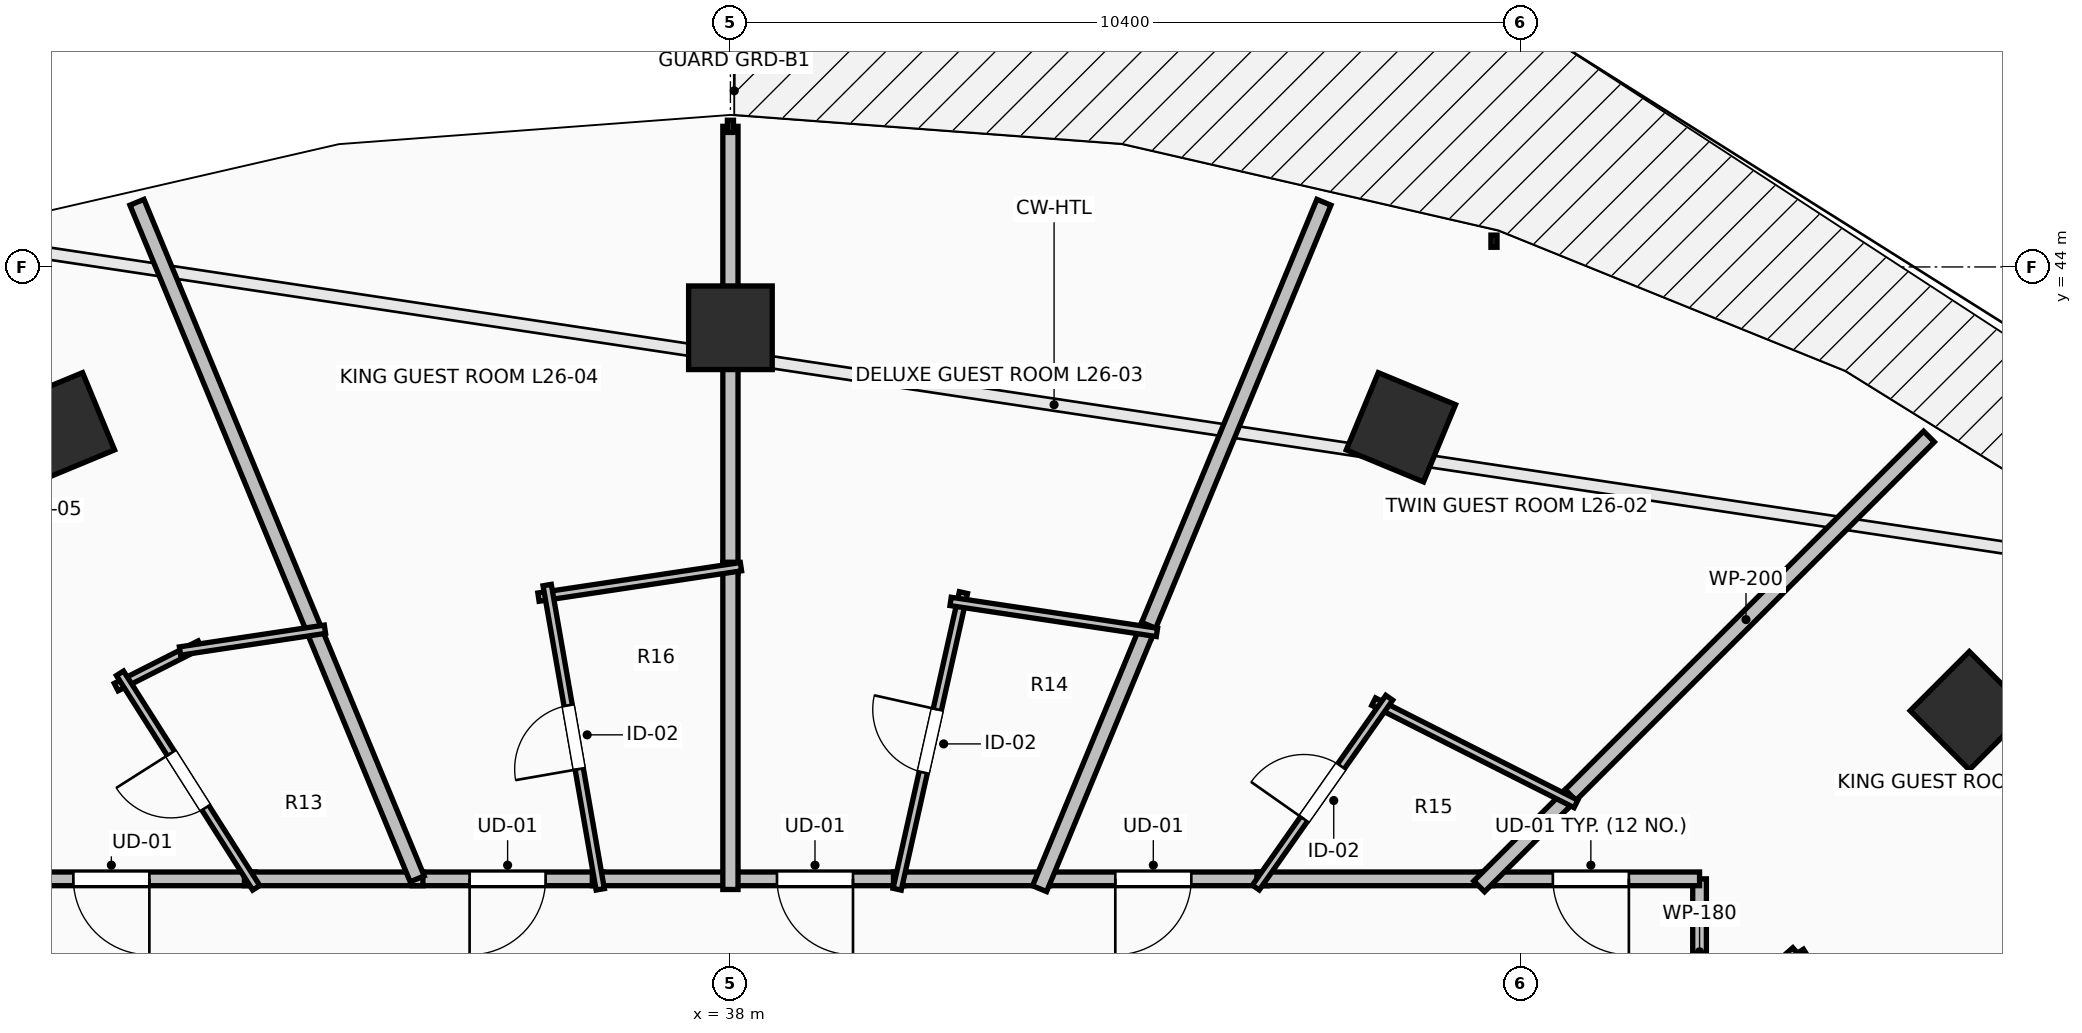
"""IFC4 building model, lengths in metres.
Left out: names, types, materials, properties, quantities, classifications, styles, units other than length and angle.
Written with IfcOpenShell. Run it as: python <this file> out.ifc"""

import sys

from ifc_helpers import new_model, si_unit, direction, frame, frame_2d, origin, origin_2d, place, context, subcontext, project, spatial, rectangle, extrude, element, fill, save


model = new_model("IFC4")
c1 = context("Model", 3, precision=1e-05, world=origin(), true_north=direction((0.0, 1.0)))
c2 = subcontext(c1, "Body", "Model", "MODEL_VIEW")
j1 = project(units=[si_unit("LENGTHUNIT", "METRE"), si_unit("PLANEANGLEUNIT", "RADIAN")], contexts=[c1])
p1 = place(None, origin())
s1 = spatial("IfcSite", under=j1, at=p1, CompositionType="ELEMENT")
p2 = place(p1, origin())
s2 = spatial("IfcBuilding", under=s1, at=p2, CompositionType="ELEMENT")
p3 = place(p2, frame((0.0, 0.0, 99.8)))
s3 = spatial("IfcBuildingStorey", under=s2, at=p3, CompositionType="ELEMENT", Elevation=99.8)
for number, where, z_axis, x_axis in (
    (1, (54.299, 38.162, 0.0), (0.0, 0.0, 1.0), (0.707, 0.707, 0.0)),
    (2, (46.821, 41.891, 0.0), (0.0, 0.0, 1.0), (0.383, 0.924, 0.0)),
    (3, (38.0, 43.2, 0.0), (0.0, 0.0, 1.0), (0.0, 1.0, 0.0)),
    (4, (29.179, 41.891, 0.0), (0.0, 0.0, 1.0), (-0.383, 0.924, 0.0)),
):
    element("IfcColumn", number, at=place(p3, frame(where, z_axis=z_axis, x_axis=x_axis)), inside=s3, PredefinedType="COLUMN", context=c2, shape_type="SweptSolid", body=[
        extrude(rectangle(XDim=1.1, YDim=1.1, at=origin_2d()), origin(), (0.0, 0.0, 1.0), 3.5),
    ])
p4 = place(p3, frame((50.75, 34.031, 0.0), z_axis=(0.0, 0.0, 1.0), x_axis=(0.0, 1.0, 0.0)))
e5 = element("IfcWall", 5, at=p4, inside=s3, PredefinedType="PARTITIONING", context=c2, shape_type="SweptSolid", body=[
    extrude(rectangle(XDim=1.919, YDim=0.18, at=frame_2d((0.959, 0.0))), origin(), (0.0, 0.0, 1.0), 2.432),
])
p5 = place(p3, frame((50.75, 35.95, 0.0), z_axis=(0.0, 0.0, 1.0), x_axis=(-1.0, 0.0, 0.0)))
e6 = element("IfcWall", 6, at=p5, inside=s3, PredefinedType="PARTITIONING", context=c2, shape_type="SweptSolid", body=[
    extrude(rectangle(XDim=2.86, YDim=0.18, at=frame_2d((1.43, 0.0))), origin(), (0.0, 0.0, 1.0), 2.432),
])
p6 = place(p5, frame((0.93, 0.0, 0.0)))
e7 = element("IfcOpeningElement", 7, at=p6, cuts=e6, PredefinedType="OPENING", context=c2, shape_type="SweptSolid", body=[
    extrude(rectangle(XDim=1.0, YDim=2.15, at=frame_2d((0.5, 1.075))), frame((0.0, 0.105, 0.0), z_axis=(0.0, -1.0, 0.0), x_axis=(1.0, 0.0, 0.0)), (0.0, 0.0, 1.0), 0.21),
])
p7 = place(p3, frame((45.066, 35.95, 0.0), z_axis=(0.0, 0.0, 1.0), x_axis=(-1.0, 0.0, 0.0)))
e8 = element("IfcWall", 8, at=p7, inside=s3, PredefinedType="PARTITIONING", context=c2, shape_type="SweptSolid", body=[
    extrude(rectangle(XDim=3.005, YDim=0.18, at=frame_2d((1.502, 0.0))), origin(), (0.0, 0.0, 1.0), 3.24),
])
p8 = place(p7, frame((1.002, 0.0, 0.0)))
e9 = element("IfcOpeningElement", 9, at=p8, cuts=e8, PredefinedType="OPENING", context=c2, shape_type="SweptSolid", body=[
    extrude(rectangle(XDim=1.0, YDim=2.15, at=frame_2d((0.5, 1.075))), frame((0.0, 0.105, 0.0), z_axis=(0.0, -1.0, 0.0), x_axis=(1.0, 0.0, 0.0)), (0.0, 0.0, 1.0), 0.21),
])
p9 = place(p3, frame((48.03, 35.95, 0.0), z_axis=(0.0, 0.0, 1.0), x_axis=(-1.0, 0.0, 0.0)))
e10 = element("IfcWall", 10, at=p9, inside=s3, PredefinedType="PARTITIONING", context=c2, shape_type="SweptSolid", body=[
    extrude(rectangle(XDim=3.104, YDim=0.18, at=frame_2d((1.552, 0.0))), origin(), (0.0, 0.0, 1.0), 2.432),
])
p10 = place(p3, frame((40.285, 35.95, 0.0), z_axis=(0.0, 0.0, 1.0), x_axis=(-1.0, 0.0, 0.0)))
e11 = element("IfcWall", 11, at=p10, inside=s3, PredefinedType="PARTITIONING", context=c2, shape_type="SweptSolid", body=[
    extrude(rectangle(XDim=2.345, YDim=0.18, at=frame_2d((1.172, 0.0))), origin(), (0.0, 0.0, 1.0), 3.24),
])
p11 = place(p10, frame((0.673, 0.0, 0.0)))
e12 = element("IfcOpeningElement", 12, at=p11, cuts=e11, PredefinedType="OPENING", context=c2, shape_type="SweptSolid", body=[
    extrude(rectangle(XDim=1.0, YDim=2.15, at=frame_2d((0.5, 1.075))), frame((0.0, 0.105, 0.0), z_axis=(0.0, -1.0, 0.0), x_axis=(1.0, 0.0, 0.0)), (0.0, 0.0, 1.0), 0.21),
])
p12 = place(p3, frame((42.201, 35.95, 0.0), z_axis=(0.0, 0.0, 1.0), x_axis=(-1.0, 0.0, 0.0)))
e13 = element("IfcWall", 13, at=p12, inside=s3, PredefinedType="PARTITIONING", context=c2, shape_type="SweptSolid", body=[
    extrude(rectangle(XDim=2.056, YDim=0.18, at=frame_2d((1.028, 0.0))), origin(), (0.0, 0.0, 1.0), 3.24),
])
p13 = place(p3, frame((36.323, 35.95, 0.0), z_axis=(0.0, 0.0, 1.0), x_axis=(-1.0, 0.0, 0.0)))
e14 = element("IfcWall", 14, at=p13, inside=s3, PredefinedType="PARTITIONING", context=c2, shape_type="SweptSolid", body=[
    extrude(rectangle(XDim=2.509, YDim=0.18, at=frame_2d((1.254, 0.0))), origin(), (0.0, 0.0, 1.0), 3.24),
])
p14 = place(p13, frame((0.754, 0.0, 0.0)))
e15 = element("IfcOpeningElement", 15, at=p14, cuts=e14, PredefinedType="OPENING", context=c2, shape_type="SweptSolid", body=[
    extrude(rectangle(XDim=1.0, YDim=2.15, at=frame_2d((0.5, 1.075))), frame((0.0, 0.105, 0.0), z_axis=(0.0, -1.0, 0.0), x_axis=(1.0, 0.0, 0.0)), (0.0, 0.0, 1.0), 0.21),
])
p15 = place(p3, frame((38.08, 35.95, 0.0), z_axis=(0.0, 0.0, 1.0), x_axis=(-1.0, 0.0, 0.0)))
e16 = element("IfcWall", 16, at=p15, inside=s3, PredefinedType="PARTITIONING", context=c2, shape_type="SweptSolid", body=[
    extrude(rectangle(XDim=1.897, YDim=0.18, at=frame_2d((0.948, 0.0))), origin(), (0.0, 0.0, 1.0), 3.24),
])
p16 = place(p3, frame((31.746, 35.95, 0.0), z_axis=(0.0, 0.0, 1.0), x_axis=(-1.0, 0.0, 0.0)))
e17 = element("IfcWall", 17, at=p16, inside=s3, PredefinedType="PARTITIONING", context=c2, shape_type="SweptSolid", body=[
    extrude(rectangle(XDim=3.781, YDim=0.18, at=frame_2d((1.891, 0.0))), origin(), (0.0, 0.0, 1.0), 2.432),
])
p17 = place(p16, frame((1.39, 0.0, 0.0)))
e18 = element("IfcOpeningElement", 18, at=p17, cuts=e17, PredefinedType="OPENING", context=c2, shape_type="SweptSolid", body=[
    extrude(rectangle(XDim=1.0, YDim=2.15, at=frame_2d((0.5, 1.075))), frame((0.0, 0.105, 0.0), z_axis=(0.0, -1.0, 0.0), x_axis=(1.0, 0.0, 0.0)), (0.0, 0.0, 1.0), 0.21),
])
p18 = place(p3, frame((33.954, 35.95, 0.0), z_axis=(0.0, 0.0, 1.0), x_axis=(-1.0, 0.0, 0.0)))
e19 = element("IfcWall", 19, at=p18, inside=s3, PredefinedType="PARTITIONING", context=c2, shape_type="SweptSolid", body=[
    extrude(rectangle(XDim=2.348, YDim=0.18, at=frame_2d((1.174, 0.0))), origin(), (0.0, 0.0, 1.0), 3.24),
])
p19 = place(p3, frame((51.935, 35.007, 0.0), z_axis=(0.0, 0.0, 1.0), x_axis=(0.662059609276, -0.749451181709, 0.0)))
e20 = element("IfcWall", 20, at=p19, inside=s3, PredefinedType="PARTITIONING", context=c2, shape_type="SweptSolid", body=[
    extrude(rectangle(XDim=3.299, YDim=0.11, at=frame_2d((1.65, 0.0))), origin(), (0.0, 0.0, 1.0), 2.432),
])
p20 = place(p19, frame((1.225, 0.0, 0.0)))
e21 = element("IfcOpeningElement", 21, at=p20, cuts=e20, PredefinedType="OPENING", context=c2, shape_type="SweptSolid", body=[
    extrude(rectangle(XDim=0.85, YDim=2.1, at=frame_2d((0.425, 1.05))), frame((0.0, 0.07, 0.0), z_axis=(0.0, -1.0, 0.0), x_axis=(1.0, 0.0, 0.0)), (0.0, 0.0, 1.0), 0.14),
])
p21 = place(p3, frame((50.632, 34.016, 0.0), z_axis=(0.0, 0.0, 1.0), x_axis=(0.844361394482, 0.535774052665, 0.0)))
e22 = element("IfcWall", 22, at=p21, inside=s3, PredefinedType="PARTITIONING", context=c2, shape_type="SweptSolid", body=[
    extrude(rectangle(XDim=1.793, YDim=0.11, at=frame_2d((0.897, 0.0))), origin(), (0.0, 0.0, 1.0), 2.886),
])
p22 = place(p3, frame((53.768, 41.768, 0.0), z_axis=(0.0, 0.0, 1.0), x_axis=(-0.707106781187, -0.707106781187, 0.0)))
e23 = element("IfcWall", 23, at=p22, inside=s3, PredefinedType="PARTITIONING", context=c2, shape_type="SweptSolid", body=[
    extrude(rectangle(XDim=6.808, YDim=0.2, at=frame_2d((3.404, 0.0))), origin(), (0.0, 0.0, 1.0), 2.677),
])
p23 = place(p3, frame((49.053, 37.053, 0.0), z_axis=(0.0, 0.0, 1.0), x_axis=(-0.707106781187, -0.707106781187, 0.0)))
e24 = element("IfcWall", 24, at=p23, inside=s3, PredefinedType="PARTITIONING", context=c2, shape_type="SweptSolid", body=[
    extrude(rectangle(XDim=1.7, YDim=0.2, at=frame_2d((0.85, 0.0))), origin(), (0.0, 0.0, 1.0), 2.432),
])
p24 = place(p3, frame((54.156, 32.692, 0.0), z_axis=(0.0, 0.0, 1.0), x_axis=(0.923875192571, 0.38269390974, 0.0)))
e25 = element("IfcWall", 25, at=p24, inside=s3, PredefinedType="PARTITIONING", context=c2, shape_type="SweptSolid", body=[
    extrude(rectangle(XDim=7.311, YDim=0.2, at=frame_2d((3.656, 0.0))), origin(), (0.0, 0.0, 1.0), 2.432),
])
p25 = place(p3, frame((46.462, 38.281, 0.0), z_axis=(0.0, 0.0, 1.0), x_axis=(0.892486842203, -0.451073426944, 0.0)))
e26 = element("IfcWall", 26, at=p25, inside=s3, PredefinedType="PARTITIONING", context=c2, shape_type="SweptSolid", body=[
    extrude(rectangle(XDim=2.982, YDim=0.11, at=frame_2d((1.491, 0.0))), origin(), (0.0, 0.0, 1.0), 2.432),
])
p26 = place(p3, frame((44.913, 35.835, 0.0), z_axis=(0.0, 0.0, 1.0), x_axis=(0.574986040322, 0.818163219312, 0.0)))
e27 = element("IfcWall", 27, at=p26, inside=s3, PredefinedType="PARTITIONING", context=c2, shape_type="SweptSolid", body=[
    extrude(rectangle(XDim=3.052, YDim=0.11, at=frame_2d((1.526, 0.0))), origin(), (0.0, 0.0, 1.0), 2.886),
])
p27 = place(p26, frame((1.101, 0.0, 0.0)))
e28 = element("IfcOpeningElement", 28, at=p27, cuts=e27, PredefinedType="OPENING", context=c2, shape_type="SweptSolid", body=[
    extrude(rectangle(XDim=0.85, YDim=2.1, at=frame_2d((0.425, 1.05))), frame((0.0, 0.07, 0.0), z_axis=(0.0, -1.0, 0.0), x_axis=(1.0, 0.0, 0.0)), (0.0, 0.0, 1.0), 0.14),
])
p28 = place(p3, frame((45.808, 44.851, 0.0), z_axis=(0.0, 0.0, 1.0), x_axis=(-0.382705075352, -0.923870567395, 0.0)))
e29 = element("IfcWall", 29, at=p28, inside=s3, PredefinedType="PARTITIONING", context=c2, shape_type="SweptSolid", body=[
    extrude(rectangle(XDim=6.164, YDim=0.2, at=frame_2d((3.082, 0.0))), origin(), (0.0, 0.0, 1.0), 2.677),
])
p29 = place(p3, frame((43.503, 39.285, 0.0), z_axis=(0.0, 0.0, 1.0), x_axis=(-0.382733183699, -0.923858923265, 0.0)))
e30 = element("IfcWall", 30, at=p29, inside=s3, PredefinedType="PARTITIONING", context=c2, shape_type="SweptSolid", body=[
    extrude(rectangle(XDim=3.75, YDim=0.2, at=frame_2d((1.875, 0.0))), origin(), (0.0, 0.0, 1.0), 2.886),
])
p30 = place(p3, frame((40.194, 35.813, 0.0), z_axis=(0.0, 0.0, 1.0), x_axis=(0.21804880916, 0.975937865248, 0.0)))
e31 = element("IfcWall", 31, at=p30, inside=s3, PredefinedType="PARTITIONING", context=c2, shape_type="SweptSolid", body=[
    extrude(rectangle(XDim=3.998, YDim=0.11, at=frame_2d((1.999, 0.0))), origin(), (0.0, 0.0, 1.0), 2.886),
])
p31 = place(p30, frame((1.574, 0.0, 0.0)))
e32 = element("IfcOpeningElement", 32, at=p31, cuts=e31, PredefinedType="OPENING", context=c2, shape_type="SweptSolid", body=[
    extrude(rectangle(XDim=0.85, YDim=2.1, at=frame_2d((0.425, 1.05))), frame((0.0, 0.07, 0.0), z_axis=(0.0, -1.0, 0.0), x_axis=(1.0, 0.0, 0.0)), (0.0, 0.0, 1.0), 0.14),
])
p32 = place(p3, frame((40.896, 39.6, 0.0), z_axis=(0.0, 0.0, 1.0), x_axis=(0.98891024541, -0.148514398367, 0.0)))
e33 = element("IfcWall", 33, at=p32, inside=s3, PredefinedType="PARTITIONING", context=c2, shape_type="SweptSolid", body=[
    extrude(rectangle(XDim=2.745, YDim=0.11, at=frame_2d((1.373, 0.0))), origin(), (0.0, 0.0, 1.0), 2.972),
])
p33 = place(p3, frame((38.0, 45.85, 0.0), z_axis=(0.0, 0.0, 1.0), x_axis=(0.0, -1.0, 0.0)))
e34 = element("IfcWall", 34, at=p33, inside=s3, PredefinedType="PARTITIONING", context=c2, shape_type="SweptSolid", body=[
    extrude(rectangle(XDim=5.875, YDim=0.2, at=frame_2d((2.938, 0.0))), origin(), (0.0, 0.0, 1.0), 3.24),
])
p34 = place(p3, frame((38.0, 40.115, 0.0), z_axis=(0.0, 0.0, 1.0), x_axis=(0.0, -1.0, 0.0)))
e35 = element("IfcWall", 35, at=p34, inside=s3, PredefinedType="PARTITIONING", context=c2, shape_type="SweptSolid", body=[
    extrude(rectangle(XDim=4.305, YDim=0.2, at=frame_2d((2.152, 0.0))), origin(), (0.0, 0.0, 1.0), 2.886),
])
p35 = place(p3, frame((35.475, 39.656, 0.0), z_axis=(0.0, 0.0, 1.0), x_axis=(0.988878442063, 0.148726012595, 0.0)))
e36 = element("IfcWall", 36, at=p35, inside=s3, PredefinedType="PARTITIONING", context=c2, shape_type="SweptSolid", body=[
    extrude(rectangle(XDim=2.694, YDim=0.11, at=frame_2d((1.347, 0.0))), origin(), (0.0, 0.0, 1.0), 2.972),
])
p36 = place(p3, frame((36.287, 35.812, 0.0), z_axis=(0.0, 0.0, 1.0), x_axis=(-0.171838135253, 0.985125197766, 0.0)))
e37 = element("IfcWall", 37, at=p36, inside=s3, PredefinedType="PARTITIONING", context=c2, shape_type="SweptSolid", body=[
    extrude(rectangle(XDim=4.063, YDim=0.11, at=frame_2d((2.032, 0.0))), origin(), (0.0, 0.0, 1.0), 2.886),
])
p37 = place(p36, frame((1.607, 0.0, 0.0)))
e38 = element("IfcOpeningElement", 38, at=p37, cuts=e37, PredefinedType="OPENING", context=c2, shape_type="SweptSolid", body=[
    extrude(rectangle(XDim=0.85, YDim=2.1, at=frame_2d((0.425, 1.05))), frame((0.0, 0.07, 0.0), z_axis=(0.0, -1.0, 0.0), x_axis=(1.0, 0.0, 0.0)), (0.0, 0.0, 1.0), 0.14),
])
p38 = place(p3, frame((30.192, 44.851, 0.0), z_axis=(0.0, 0.0, 1.0), x_axis=(0.382687492799, -0.923877850614, 0.0)))
e39 = element("IfcWall", 39, at=p38, inside=s3, PredefinedType="PARTITIONING", context=c2, shape_type="SweptSolid", body=[
    extrude(rectangle(XDim=9.635, YDim=0.2, at=frame_2d((4.817, 0.0))), origin(), (0.0, 0.0, 1.0), 2.432),
])
p39 = place(p3, frame((29.919, 38.473, 0.0), z_axis=(0.0, 0.0, 1.0), x_axis=(0.892084606746, 0.45186840386, 0.0)))
e40 = element("IfcWall", 40, at=p39, inside=s3, PredefinedType="PARTITIONING", context=c2, shape_type="SweptSolid", body=[
    extrude(rectangle(XDim=1.236, YDim=0.11, at=frame_2d((0.618, 0.0))), origin(), (0.0, 0.0, 1.0), 3.24),
])
p40 = place(p3, frame((30.759, 38.947, 0.0), z_axis=(0.0, 0.0, 1.0), x_axis=(0.988889867338, 0.148650026153, 0.0)))
e41 = element("IfcWall", 41, at=p40, inside=s3, PredefinedType="PARTITIONING", context=c2, shape_type="SweptSolid", body=[
    extrude(rectangle(XDim=1.928, YDim=0.11, at=frame_2d((0.964, 0.0))), origin(), (0.0, 0.0, 1.0), 3.24),
])
p41 = place(p3, frame((31.761, 35.832, 0.0), z_axis=(0.0, 0.0, 1.0), x_axis=(-0.535991614842, 0.844223305067, 0.0)))
e42 = element("IfcWall", 42, at=p41, inside=s3, PredefinedType="PARTITIONING", context=c2, shape_type="SweptSolid", body=[
    extrude(rectangle(XDim=3.343, YDim=0.11, at=frame_2d((1.672, 0.0))), origin(), (0.0, 0.0, 1.0), 2.432),
])
p42 = place(p41, frame((1.247, 0.0, 0.0)))
e43 = element("IfcOpeningElement", 43, at=p42, cuts=e42, PredefinedType="OPENING", context=c2, shape_type="SweptSolid", body=[
    extrude(rectangle(XDim=0.85, YDim=2.1, at=frame_2d((0.425, 1.05))), frame((0.0, 0.07, 0.0), z_axis=(0.0, -1.0, 0.0), x_axis=(1.0, 0.0, 0.0)), (0.0, 0.0, 1.0), 0.14),
])
p43 = place(p6, origin())
e44 = element("IfcDoor", 44, at=p43, inside=s3, OperationType="SINGLE_SWING_LEFT", PredefinedType="DOOR", context=c2, shape_type="SweptSolid", body=[
    extrude(rectangle(XDim=1.0, YDim=2.15, at=frame_2d((0.5, 1.075))), frame((0.0, 0.025, 0.0), z_axis=(0.0, -1.0, 0.0), x_axis=(1.0, 0.0, 0.0)), (0.0, 0.0, 1.0), 0.05),
])
fill(e7, e44)
p44 = place(p8, origin())
e45 = element("IfcDoor", 45, at=p44, inside=s3, OperationType="SINGLE_SWING_RIGHT", PredefinedType="DOOR", context=c2, shape_type="SweptSolid", body=[
    extrude(rectangle(XDim=1.0, YDim=2.15, at=frame_2d((0.5, 1.075))), frame((0.0, 0.025, 0.0), z_axis=(0.0, -1.0, 0.0), x_axis=(1.0, 0.0, 0.0)), (0.0, 0.0, 1.0), 0.05),
])
fill(e9, e45)
p45 = place(p11, origin())
e46 = element("IfcDoor", 46, at=p45, inside=s3, OperationType="SINGLE_SWING_LEFT", PredefinedType="DOOR", context=c2, shape_type="SweptSolid", body=[
    extrude(rectangle(XDim=1.0, YDim=2.15, at=frame_2d((0.5, 1.075))), frame((0.0, 0.025, 0.0), z_axis=(0.0, -1.0, 0.0), x_axis=(1.0, 0.0, 0.0)), (0.0, 0.0, 1.0), 0.05),
])
fill(e12, e46)
p46 = place(p14, origin())
e47 = element("IfcDoor", 47, at=p46, inside=s3, OperationType="SINGLE_SWING_RIGHT", PredefinedType="DOOR", context=c2, shape_type="SweptSolid", body=[
    extrude(rectangle(XDim=1.0, YDim=2.15, at=frame_2d((0.5, 1.075))), frame((0.0, 0.025, 0.0), z_axis=(0.0, -1.0, 0.0), x_axis=(1.0, 0.0, 0.0)), (0.0, 0.0, 1.0), 0.05),
])
fill(e15, e47)
p47 = place(p17, origin())
e48 = element("IfcDoor", 48, at=p47, inside=s3, OperationType="SINGLE_SWING_LEFT", PredefinedType="DOOR", context=c2, shape_type="SweptSolid", body=[
    extrude(rectangle(XDim=1.0, YDim=2.15, at=frame_2d((0.5, 1.075))), frame((0.0, 0.025, 0.0), z_axis=(0.0, -1.0, 0.0), x_axis=(1.0, 0.0, 0.0)), (0.0, 0.0, 1.0), 0.05),
])
fill(e18, e48)
p48 = place(p27, origin())
e49 = element("IfcDoor", 49, at=p48, inside=s3, OperationType="SINGLE_SWING_LEFT", PredefinedType="DOOR", context=c2, shape_type="SweptSolid", body=[
    extrude(rectangle(XDim=0.85, YDim=2.1, at=frame_2d((0.425, 1.05))), frame((0.0, 0.025, 0.0), z_axis=(0.0, -1.0, 0.0), x_axis=(1.0, 0.0, 0.0)), (0.0, 0.0, 1.0), 0.05),
])
fill(e28, e49)
p49 = place(p31, origin())
e50 = element("IfcDoor", 50, at=p49, inside=s3, OperationType="SINGLE_SWING_RIGHT", PredefinedType="DOOR", context=c2, shape_type="SweptSolid", body=[
    extrude(rectangle(XDim=0.85, YDim=2.1, at=frame_2d((0.425, 1.05))), frame((0.0, 0.025, 0.0), z_axis=(0.0, -1.0, 0.0), x_axis=(1.0, 0.0, 0.0)), (0.0, 0.0, 1.0), 0.05),
])
fill(e32, e50)
p50 = place(p37, origin())
e51 = element("IfcDoor", 51, at=p50, inside=s3, OperationType="SINGLE_SWING_LEFT", PredefinedType="DOOR", context=c2, shape_type="SweptSolid", body=[
    extrude(rectangle(XDim=0.85, YDim=2.1, at=frame_2d((0.425, 1.05))), frame((0.0, 0.025, 0.0), z_axis=(0.0, -1.0, 0.0), x_axis=(1.0, 0.0, 0.0)), (0.0, 0.0, 1.0), 0.05),
])
fill(e38, e51)
p51 = place(p42, origin())
e52 = element("IfcDoor", 52, at=p51, inside=s3, OperationType="SINGLE_SWING_RIGHT", PredefinedType="DOOR", context=c2, shape_type="SweptSolid", body=[
    extrude(rectangle(XDim=0.85, YDim=2.1, at=frame_2d((0.425, 1.05))), frame((0.0, 0.025, 0.0), z_axis=(0.0, -1.0, 0.0), x_axis=(1.0, 0.0, 0.0)), (0.0, 0.0, 1.0), 0.05),
])
fill(e43, e52)
save(model, sys.argv[1])
